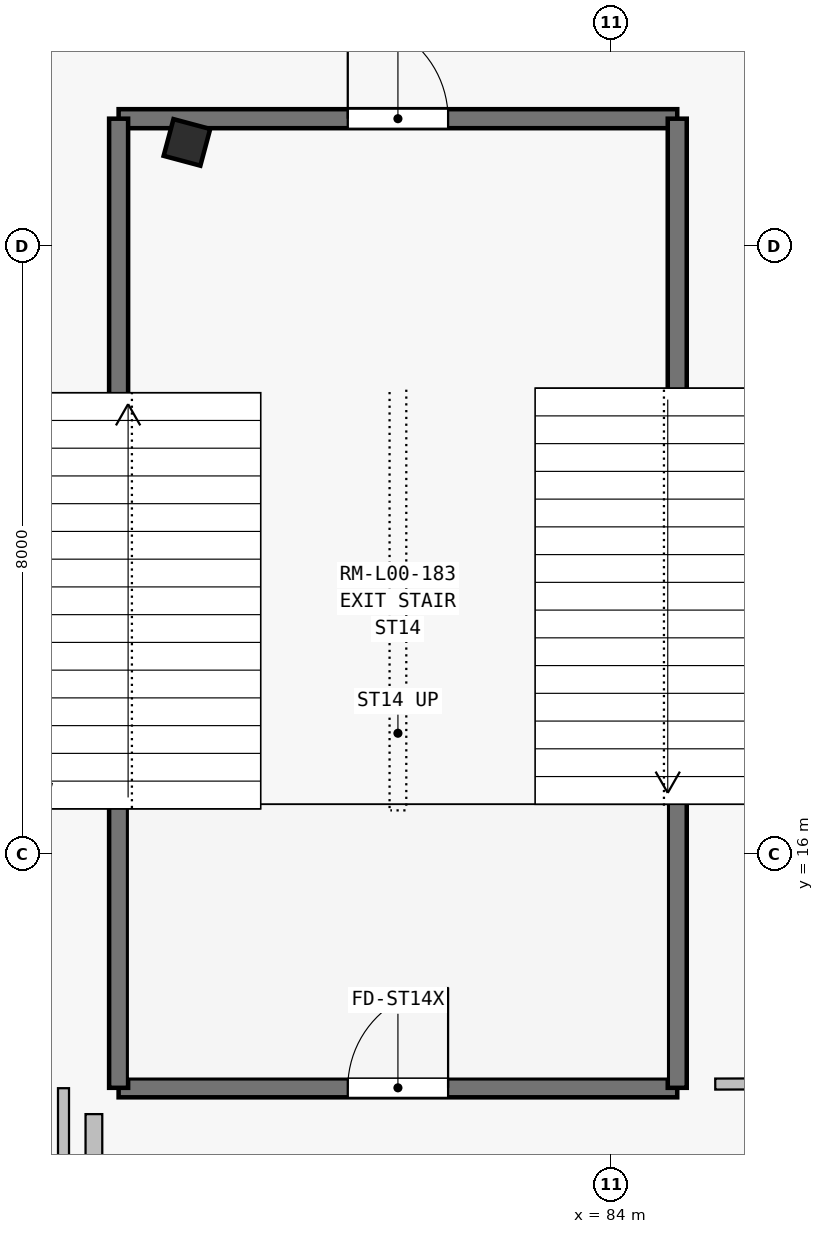
"""IFC4 building model, lengths in metres.
Left out: names, types, materials, properties, quantities, classifications, styles, units other than length and angle.
Written with IfcOpenShell. Run it as: python <this file> out.ifc"""

import sys

from ifc_helpers import new_model, si_unit, direction, frame, frame_2d, origin, origin_2d, place, context, subcontext, project, spatial, rectangle, i_section, extrude, element, fill, save


model = new_model("IFC4")
c1 = context("Model", 3, precision=1e-05, world=origin(), true_north=direction((0.0, 1.0)))
c2 = subcontext(c1, "Body", "Model", "MODEL_VIEW")
j1 = project(units=[si_unit("LENGTHUNIT", "METRE"), si_unit("PLANEANGLEUNIT", "RADIAN")], contexts=[c1])
p1 = place(None, origin())
s1 = spatial("IfcSite", under=j1, at=p1, CompositionType="ELEMENT")
p2 = place(p1, origin())
s2 = spatial("IfcBuilding", under=s1, at=p2, CompositionType="ELEMENT")
p3 = place(p2, origin())
s3 = spatial("IfcBuildingStorey", under=s2, at=p3, CompositionType="ELEMENT", Elevation=0.0)
p4 = place(p3, frame((78.424, 25.363, 0.0), z_axis=(0.0, 0.0, 1.0), x_axis=(-0.258819045103, -0.965925826289, 0.0)))
e1 = element("IfcColumn", 1, at=p4, inside=s3, PredefinedType="COLUMN", context=c2, shape_type="SweptSolid", body=[
    extrude(i_section(OverallWidth=0.5, OverallDepth=0.5, WebThickness=0.025, FlangeThickness=0.042, at=origin_2d()), origin(), (0.0, 0.0, 1.0), 5.4),
])
p5 = place(p3, frame((77.525, 12.925, 0.0), z_axis=(0.0, 0.0, 1.0), x_axis=(1.0, 0.0, 0.0)))
e2 = element("IfcWall", 2, at=p5, inside=s3, PredefinedType="SHEAR", context=c2, shape_type="SweptSolid", body=[
    extrude(rectangle(XDim=7.35, YDim=0.25, at=frame_2d((3.675, 0.0))), origin(), (0.0, 0.0, 1.0), 5.4),
])
p6 = place(p5, frame((3.015, 0.0, 0.0)))
e3 = element("IfcOpeningElement", 3, at=p6, cuts=e2, PredefinedType="OPENING", context=c2, shape_type="SweptSolid", body=[
    extrude(rectangle(XDim=1.32, YDim=2.2, at=frame_2d((0.66, 1.1))), frame((0.0, 0.135, 0.0), z_axis=(0.0, -1.0, 0.0), x_axis=(1.0, 0.0, 0.0)), (0.0, 0.0, 1.0), 0.27),
])
p7 = place(p3, frame((77.525, 25.675, 0.0), z_axis=(0.0, 0.0, 1.0), x_axis=(1.0, 0.0, 0.0)))
e4 = element("IfcWall", 4, at=p7, inside=s3, PredefinedType="SHEAR", context=c2, shape_type="SweptSolid", body=[
    extrude(rectangle(XDim=7.35, YDim=0.25, at=frame_2d((3.675, 0.0))), origin(), (0.0, 0.0, 1.0), 5.4),
])
p8 = place(p7, frame((3.015, 0.0, 0.0)))
e5 = element("IfcOpeningElement", 5, at=p8, cuts=e4, PredefinedType="OPENING", context=c2, shape_type="SweptSolid", body=[
    extrude(rectangle(XDim=1.32, YDim=2.2, at=frame_2d((0.66, 1.1))), frame((0.0, 0.135, 0.0), z_axis=(0.0, -1.0, 0.0), x_axis=(1.0, 0.0, 0.0)), (0.0, 0.0, 1.0), 0.27),
])
for number, where, z_axis, x_axis in (
    (6, (77.525, 12.925, 0.0), (0.0, 0.0, 1.0), (0.0, 1.0, 0.0)),
    (7, (84.875, 12.925, 0.0), (0.0, 0.0, 1.0), (0.0, 1.0, 0.0)),
):
    element("IfcWall", number, at=place(p3, frame(where, z_axis=z_axis, x_axis=x_axis)), inside=s3, PredefinedType="SHEAR", context=c2, shape_type="SweptSolid", body=[
        extrude(rectangle(XDim=12.75, YDim=0.25, at=frame_2d((6.375, 0.0))), origin(), (0.0, 0.0, 1.0), 5.4),
    ])
p9 = place(p3, frame((76.8, 12.92, 0.0), z_axis=(0.0, 0.0, 1.0), x_axis=(0.0, -1.0, 0.0)))
e8 = element("IfcWall", 8, at=p9, inside=s3, PredefinedType="PARTITIONING", context=c2, shape_type="SweptSolid", body=[
    extrude(rectangle(XDim=10.571, YDim=0.145, at=frame_2d((5.285, 0.0))), origin(), (0.0, 0.0, 1.0), 4.295),
])
p10 = place(p3, frame((85.375, 12.974, 0.0), z_axis=(0.0, 0.0, 1.0), x_axis=(0.99999517769, 0.003105575086, 0.0)))
e9 = element("IfcWall", 9, at=p10, inside=s3, PredefinedType="PARTITIONING", context=c2, shape_type="SweptSolid", body=[
    extrude(rectangle(XDim=7.94, YDim=0.145, at=frame_2d((3.97, 0.0))), origin(), (0.0, 0.0, 1.0), 4.483),
])
p11 = place(p10, frame((3.43, 0.0, 0.0)))
e10 = element("IfcOpeningElement", 10, at=p11, cuts=e9, PredefinedType="OPENING", context=c2, shape_type="SweptSolid", body=[
    extrude(rectangle(XDim=1.08, YDim=2.15, at=frame_2d((0.54, 1.075))), frame((0.0, 0.083, 0.0), z_axis=(0.0, -1.0, 0.0), x_axis=(1.0, 0.0, 0.0)), (0.0, 0.0, 1.0), 0.165),
])
p12 = place(p3, frame((77.2, 2.312, 0.0), z_axis=(0.0, 0.0, 1.0), x_axis=(0.0, 1.0, 0.0)))
e11 = element("IfcWall", 11, at=p12, inside=s3, PredefinedType="SOLIDWALL", context=c2, shape_type="SweptSolid", body=[
    extrude(rectangle(XDim=10.267, YDim=0.22, at=frame_2d((5.133, 0.0))), origin(), (0.0, 0.0, 1.0), 4.295),
])
p13 = place(p8, origin())
e12 = element("IfcDoor", 12, at=p13, inside=s3, OperationType="SINGLE_SWING_LEFT", PredefinedType="DOOR", context=c2, shape_type="SweptSolid", body=[
    extrude(rectangle(XDim=1.32, YDim=2.2, at=frame_2d((0.66, 1.1))), frame((0.0, 0.025, 0.0), z_axis=(0.0, -1.0, 0.0), x_axis=(1.0, 0.0, 0.0)), (0.0, 0.0, 1.0), 0.05),
])
fill(e5, e12)
p14 = place(p6, origin())
e13 = element("IfcDoor", 13, at=p14, inside=s3, OperationType="SINGLE_SWING_RIGHT", PredefinedType="DOOR", context=c2, shape_type="SweptSolid", body=[
    extrude(rectangle(XDim=1.32, YDim=2.2, at=frame_2d((0.66, 1.1))), frame((0.0, 0.025, 0.0), z_axis=(0.0, -1.0, 0.0), x_axis=(1.0, 0.0, 0.0)), (0.0, 0.0, 1.0), 0.05),
])
fill(e3, e13)
save(model, sys.argv[1])
